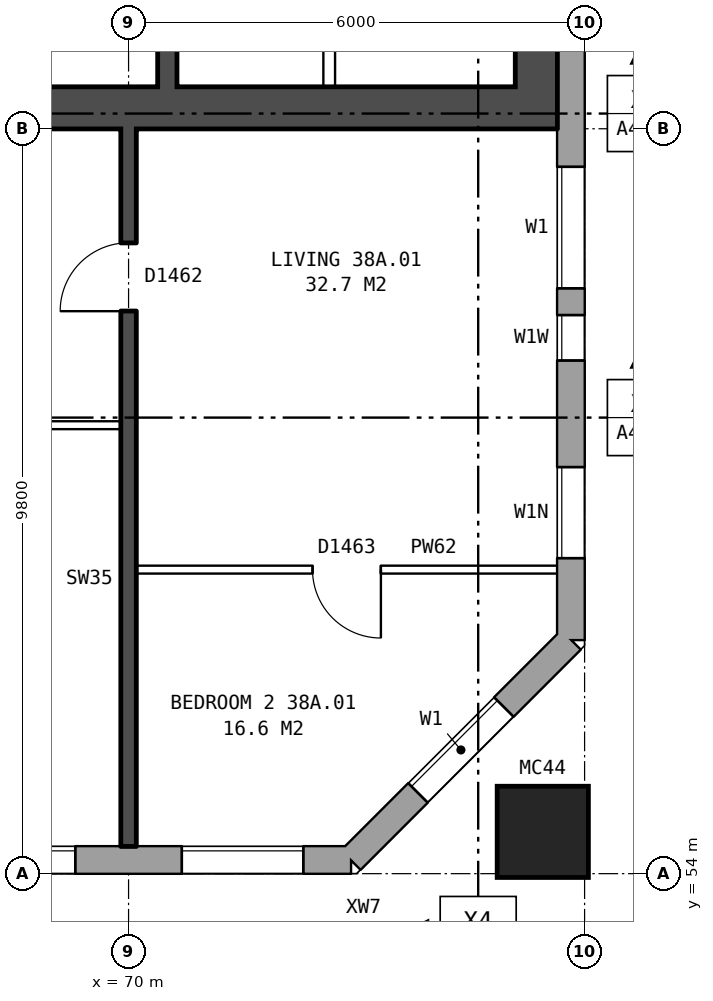
"""IFC4 building model, lengths in metres.
Left out: names, types, materials, properties, quantities, classifications, styles, units other than length and angle.
Written with IfcOpenShell. Run it as: python <this file> out.ifc"""

import sys

from ifc_helpers import new_model, si_unit, direction, frame, frame_2d, origin, origin_2d, place, context, subcontext, project, spatial, rectangle, hollow_rectangle, extrude, element, fill, save


model = new_model("IFC4")
c1 = context("Model", 3, precision=1e-05, world=origin(), true_north=direction((0.0, 1.0)))
c2 = subcontext(c1, "Body", "Model", "MODEL_VIEW")
j1 = project(units=[si_unit("LENGTHUNIT", "METRE"), si_unit("PLANEANGLEUNIT", "RADIAN")], contexts=[c1])
p1 = place(None, origin())
s1 = spatial("IfcSite", under=j1, at=p1, CompositionType="ELEMENT")
p2 = place(p1, origin())
s2 = spatial("IfcBuilding", under=s1, at=p2, CompositionType="ELEMENT")
p3 = place(p2, frame((0.0, 0.0, 136.1)))
s3 = spatial("IfcBuildingStorey", under=s2, at=p3, CompositionType="ELEMENT", Elevation=136.1)
p4 = place(p3, frame((75.45, 54.55, 0.0), z_axis=(0.0, 0.0, 1.0), x_axis=(1.0, 0.0, 0.0)))
e1 = element("IfcColumn", 1, at=p4, inside=s3, PredefinedType="COLUMN", context=c2, shape_type="SweptSolid", body=[
    extrude(hollow_rectangle(XDim=1.2, YDim=1.2, WallThickness=0.065, at=origin_2d()), origin(), (0.0, 0.0, 1.0), 3.1),
])
p5 = place(p3, frame((29.825, 54.18, 0.0), z_axis=(0.0, 0.0, 1.0), x_axis=(1.0, 0.0, 0.0)))
e2 = element("IfcWall", 2, at=p5, inside=s3, PredefinedType="STANDARD", context=c2, shape_type="SweptSolid", body=[
    extrude(rectangle(XDim=43.101, YDim=0.36, at=frame_2d((21.55, 0.0))), origin(), (0.0, 0.0, 1.0), 2.85),
])
p6 = place(p5, frame((1.875, 0.0, 0.8)))
e3 = element("IfcOpeningElement", 3, at=p6, cuts=e2, PredefinedType="OPENING", context=c2, shape_type="SweptSolid", body=[
    extrude(rectangle(XDim=1.6, YDim=1.8, at=frame_2d((0.8, 0.9))), frame((0.0, 0.19, 0.0), z_axis=(0.0, -1.0, 0.0), x_axis=(1.0, 0.0, 0.0)), (0.0, 0.0, 1.0), 0.38),
])
p7 = place(p5, frame((4.875, 0.0, 0.8)))
e4 = element("IfcOpeningElement", 4, at=p7, cuts=e2, PredefinedType="OPENING", context=c2, shape_type="SweptSolid", body=[
    extrude(rectangle(XDim=1.6, YDim=1.8, at=frame_2d((0.8, 0.9))), frame((0.0, 0.19, 0.0), z_axis=(0.0, -1.0, 0.0), x_axis=(1.0, 0.0, 0.0)), (0.0, 0.0, 1.0), 0.38),
])
p8 = place(p5, frame((7.875, 0.0, 0.8)))
e5 = element("IfcOpeningElement", 5, at=p8, cuts=e2, PredefinedType="OPENING", context=c2, shape_type="SweptSolid", body=[
    extrude(rectangle(XDim=1.6, YDim=1.8, at=frame_2d((0.8, 0.9))), frame((0.0, 0.19, 0.0), z_axis=(0.0, -1.0, 0.0), x_axis=(1.0, 0.0, 0.0)), (0.0, 0.0, 1.0), 0.38),
])
p9 = place(p5, frame((10.875, 0.0, 0.8)))
e6 = element("IfcOpeningElement", 6, at=p9, cuts=e2, PredefinedType="OPENING", context=c2, shape_type="SweptSolid", body=[
    extrude(rectangle(XDim=1.6, YDim=1.8, at=frame_2d((0.8, 0.9))), frame((0.0, 0.19, 0.0), z_axis=(0.0, -1.0, 0.0), x_axis=(1.0, 0.0, 0.0)), (0.0, 0.0, 1.0), 0.38),
])
p10 = place(p5, frame((13.875, 0.0, 0.8)))
e7 = element("IfcOpeningElement", 7, at=p10, cuts=e2, PredefinedType="OPENING", context=c2, shape_type="SweptSolid", body=[
    extrude(rectangle(XDim=1.6, YDim=1.8, at=frame_2d((0.8, 0.9))), frame((0.0, 0.19, 0.0), z_axis=(0.0, -1.0, 0.0), x_axis=(1.0, 0.0, 0.0)), (0.0, 0.0, 1.0), 0.38),
])
p11 = place(p5, frame((16.975, 0.0, 0.15)))
e8 = element("IfcOpeningElement", 8, at=p11, cuts=e2, PredefinedType="OPENING", context=c2, shape_type="SweptSolid", body=[
    extrude(rectangle(XDim=0.6, YDim=0.9, at=frame_2d((0.3, 0.45))), frame((0.0, 0.19, 0.0), z_axis=(0.0, -1.0, 0.0), x_axis=(1.0, 0.0, 0.0)), (0.0, 0.0, 1.0), 0.38),
])
p12 = place(p5, frame((19.875, 0.0, 0.8)))
e9 = element("IfcOpeningElement", 9, at=p12, cuts=e2, PredefinedType="OPENING", context=c2, shape_type="SweptSolid", body=[
    extrude(rectangle(XDim=1.6, YDim=1.8, at=frame_2d((0.8, 0.9))), frame((0.0, 0.19, 0.0), z_axis=(0.0, -1.0, 0.0), x_axis=(1.0, 0.0, 0.0)), (0.0, 0.0, 1.0), 0.38),
])
p13 = place(p5, frame((22.875, 0.0, 0.8)))
e10 = element("IfcOpeningElement", 10, at=p13, cuts=e2, PredefinedType="OPENING", context=c2, shape_type="SweptSolid", body=[
    extrude(rectangle(XDim=1.6, YDim=1.8, at=frame_2d((0.8, 0.9))), frame((0.0, 0.19, 0.0), z_axis=(0.0, -1.0, 0.0), x_axis=(1.0, 0.0, 0.0)), (0.0, 0.0, 1.0), 0.38),
])
p14 = place(p5, frame((25.325, 0.0, 0.15)))
e11 = element("IfcOpeningElement", 11, at=p14, cuts=e2, PredefinedType="OPENING", context=c2, shape_type="SweptSolid", body=[
    extrude(rectangle(XDim=0.8, YDim=0.9, at=frame_2d((0.4, 0.45))), frame((0.0, 0.19, 0.0), z_axis=(0.0, -1.0, 0.0), x_axis=(1.0, 0.0, 0.0)), (0.0, 0.0, 1.0), 0.38),
])
p15 = place(p5, frame((28.875, 0.0, 0.8)))
e12 = element("IfcOpeningElement", 12, at=p15, cuts=e2, PredefinedType="OPENING", context=c2, shape_type="SweptSolid", body=[
    extrude(rectangle(XDim=1.6, YDim=1.8, at=frame_2d((0.8, 0.9))), frame((0.0, 0.19, 0.0), z_axis=(0.0, -1.0, 0.0), x_axis=(1.0, 0.0, 0.0)), (0.0, 0.0, 1.0), 0.38),
])
p16 = place(p5, frame((31.875, 0.0, 0.8)))
e13 = element("IfcOpeningElement", 13, at=p16, cuts=e2, PredefinedType="OPENING", context=c2, shape_type="SweptSolid", body=[
    extrude(rectangle(XDim=1.6, YDim=1.8, at=frame_2d((0.8, 0.9))), frame((0.0, 0.19, 0.0), z_axis=(0.0, -1.0, 0.0), x_axis=(1.0, 0.0, 0.0)), (0.0, 0.0, 1.0), 0.38),
])
p17 = place(p5, frame((34.875, 0.0, 0.8)))
e14 = element("IfcOpeningElement", 14, at=p17, cuts=e2, PredefinedType="OPENING", context=c2, shape_type="SweptSolid", body=[
    extrude(rectangle(XDim=1.6, YDim=1.8, at=frame_2d((0.8, 0.9))), frame((0.0, 0.19, 0.0), z_axis=(0.0, -1.0, 0.0), x_axis=(1.0, 0.0, 0.0)), (0.0, 0.0, 1.0), 0.38),
])
p18 = place(p5, frame((37.875, 0.0, 0.8)))
e15 = element("IfcOpeningElement", 15, at=p18, cuts=e2, PredefinedType="OPENING", context=c2, shape_type="SweptSolid", body=[
    extrude(rectangle(XDim=1.6, YDim=1.8, at=frame_2d((0.8, 0.9))), frame((0.0, 0.19, 0.0), z_axis=(0.0, -1.0, 0.0), x_axis=(1.0, 0.0, 0.0)), (0.0, 0.0, 1.0), 0.38),
])
p19 = place(p5, frame((40.875, 0.0, 0.8)))
e16 = element("IfcOpeningElement", 16, at=p19, cuts=e2, PredefinedType="OPENING", context=c2, shape_type="SweptSolid", body=[
    extrude(rectangle(XDim=1.6, YDim=1.8, at=frame_2d((0.8, 0.9))), frame((0.0, 0.19, 0.0), z_axis=(0.0, -1.0, 0.0), x_axis=(1.0, 0.0, 0.0)), (0.0, 0.0, 1.0), 0.38),
])
p20 = place(p5, frame((17.925, 0.0, 0.15)))
e17 = element("IfcOpeningElement", 17, at=p20, cuts=e2, PredefinedType="OPENING", context=c2, shape_type="SweptSolid", body=[
    extrude(rectangle(XDim=1.0, YDim=1.8, at=frame_2d((0.5, 0.9))), frame((0.0, 0.19, 0.0), z_axis=(0.0, -1.0, 0.0), x_axis=(1.0, 0.0, 0.0)), (0.0, 0.0, 1.0), 0.38),
])
p21 = place(p5, frame((26.975, 0.0, 1.35)))
e18 = element("IfcOpeningElement", 18, at=p21, cuts=e2, PredefinedType="OPENING", context=c2, shape_type="SweptSolid", body=[
    extrude(rectangle(XDim=1.0, YDim=1.2, at=frame_2d((0.5, 0.6))), frame((0.0, 0.19, 0.0), z_axis=(0.0, -1.0, 0.0), x_axis=(1.0, 0.0, 0.0)), (0.0, 0.0, 1.0), 0.38),
])
p22 = place(p3, frame((72.925, 54.18, 0.0), z_axis=(0.0, 0.0, 1.0), x_axis=(0.707106781187, 0.707106781187, 0.0)))
e19 = element("IfcWall", 19, at=p22, inside=s3, PredefinedType="STANDARD", context=c2, shape_type="SweptSolid", body=[
    extrude(rectangle(XDim=4.094, YDim=0.36, at=frame_2d((2.047, 0.0))), origin(), (0.0, 0.0, 1.0), 2.85),
])
p23 = place(p22, frame((1.247, 0.0, 0.8)))
e20 = element("IfcOpeningElement", 20, at=p23, cuts=e19, PredefinedType="OPENING", context=c2, shape_type="SweptSolid", body=[
    extrude(rectangle(XDim=1.6, YDim=1.8, at=frame_2d((0.8, 0.9))), frame((0.0, 0.19, 0.0), z_axis=(0.0, -1.0, 0.0), x_axis=(1.0, 0.0, 0.0)), (0.0, 0.0, 1.0), 0.38),
])
p24 = place(p3, frame((75.82, 57.075, 0.0), z_axis=(0.0, 0.0, 1.0), x_axis=(0.0, 1.0, 0.0)))
e21 = element("IfcWall", 21, at=p24, inside=s3, PredefinedType="STANDARD", context=c2, shape_type="SweptSolid", body=[
    extrude(rectangle(XDim=25.851, YDim=0.36, at=frame_2d((12.925, 0.0))), origin(), (0.0, 0.0, 1.0), 2.85),
])
p25 = place(p24, frame((1.075, 0.0, 0.8)))
e22 = element("IfcOpeningElement", 22, at=p25, cuts=e21, PredefinedType="OPENING", context=c2, shape_type="SweptSolid", body=[
    extrude(rectangle(XDim=1.2, YDim=1.2, at=frame_2d((0.6, 0.6))), frame((0.0, 0.19, 0.0), z_axis=(0.0, -1.0, 0.0), x_axis=(1.0, 0.0, 0.0)), (0.0, 0.0, 1.0), 0.38),
])
p26 = place(p24, frame((4.625, 0.0, 0.8)))
e23 = element("IfcOpeningElement", 23, at=p26, cuts=e21, PredefinedType="OPENING", context=c2, shape_type="SweptSolid", body=[
    extrude(rectangle(XDim=1.6, YDim=1.8, at=frame_2d((0.8, 0.9))), frame((0.0, 0.19, 0.0), z_axis=(0.0, -1.0, 0.0), x_axis=(1.0, 0.0, 0.0)), (0.0, 0.0, 1.0), 0.38),
])
p27 = place(p24, frame((19.625, 0.0, 0.8)))
e24 = element("IfcOpeningElement", 24, at=p27, cuts=e21, PredefinedType="OPENING", context=c2, shape_type="SweptSolid", body=[
    extrude(rectangle(XDim=1.6, YDim=1.8, at=frame_2d((0.8, 0.9))), frame((0.0, 0.19, 0.0), z_axis=(0.0, -1.0, 0.0), x_axis=(1.0, 0.0, 0.0)), (0.0, 0.0, 1.0), 0.38),
])
p28 = place(p24, frame((23.125, 0.0, 0.8)))
e25 = element("IfcOpeningElement", 25, at=p28, cuts=e21, PredefinedType="OPENING", context=c2, shape_type="SweptSolid", body=[
    extrude(rectangle(XDim=1.0, YDim=0.9, at=frame_2d((0.5, 0.45))), frame((0.0, 0.19, 0.0), z_axis=(0.0, -1.0, 0.0), x_axis=(1.0, 0.0, 0.0)), (0.0, 0.0, 1.0), 0.38),
])
p29 = place(p24, frame((3.675, 0.0, 1.7)))
e26 = element("IfcOpeningElement", 26, at=p29, cuts=e21, PredefinedType="OPENING", context=c2, shape_type="SweptSolid", body=[
    extrude(rectangle(XDim=0.6, YDim=0.9, at=frame_2d((0.3, 0.45))), frame((0.0, 0.19, 0.0), z_axis=(0.0, -1.0, 0.0), x_axis=(1.0, 0.0, 0.0)), (0.0, 0.0, 1.0), 0.38),
])
p30 = place(p24, frame((24.425, 0.0, 0.8)))
e27 = element("IfcOpeningElement", 27, at=p30, cuts=e21, PredefinedType="OPENING", context=c2, shape_type="SweptSolid", body=[
    extrude(rectangle(XDim=1.0, YDim=1.8, at=frame_2d((0.5, 0.9))), frame((0.0, 0.19, 0.0), z_axis=(0.0, -1.0, 0.0), x_axis=(1.0, 0.0, 0.0)), (0.0, 0.0, 1.0), 0.38),
])
p31 = place(p3, frame((75.365, 63.8, 0.0), z_axis=(0.0, 0.0, 1.0), x_axis=(0.0, 1.0, 0.0)))
e28 = element("IfcWall", 28, at=p31, inside=s3, PredefinedType="SHEAR", context=c2, shape_type="SweptSolid", body=[
    extrude(rectangle(XDim=12.4, YDim=0.55, at=frame_2d((6.2, 0.0))), origin(), (0.0, 0.0, 1.0), 2.85),
])
p32 = place(p3, frame((67.19, 64.075, 0.0), z_axis=(0.0, 0.0, 1.0), x_axis=(1.0, 0.0, 0.0)))
e29 = element("IfcWall", 29, at=p32, inside=s3, PredefinedType="SHEAR", context=c2, shape_type="SweptSolid", body=[
    extrude(rectangle(XDim=7.9, YDim=0.55, at=frame_2d((3.95, 0.0))), origin(), (0.0, 0.0, 1.0), 2.85),
])
p33 = place(p3, frame((70.51, 64.35, 0.0), z_axis=(0.0, 0.0, 1.0), x_axis=(0.0, 1.0, 0.0)))
e30 = element("IfcWall", 30, at=p33, inside=s3, PredefinedType="SHEAR", context=c2, shape_type="SweptSolid", body=[
    extrude(rectangle(XDim=2.375, YDim=0.25, at=frame_2d((1.188, 0.0))), origin(), (0.0, 0.0, 1.0), 2.85),
])
p34 = place(p3, frame((72.64, 64.35, 0.0), z_axis=(0.0, 0.0, 1.0), x_axis=(0.0, 1.0, 0.0)))
e31 = element("IfcWall", 31, at=p34, inside=s3, PredefinedType="PARTITIONING", context=c2, shape_type="SweptSolid", body=[
    extrude(rectangle(XDim=1.875, YDim=0.15, at=frame_2d((0.938, 0.0))), origin(), (0.0, 0.0, 1.0), 2.85),
])
p35 = place(p34, frame((0.512, 0.0, 0.0)))
e32 = element("IfcOpeningElement", 32, at=p35, cuts=e31, PredefinedType="OPENING", context=c2, shape_type="SweptSolid", body=[
    extrude(rectangle(XDim=0.85, YDim=2.1, at=frame_2d((0.425, 1.05))), frame((0.0, 0.085, 0.0), z_axis=(0.0, -1.0, 0.0), x_axis=(1.0, 0.0, 0.0)), (0.0, 0.0, 1.0), 0.17),
])
p36 = place(p3, frame((70.1, 58.0, 0.0), z_axis=(0.0, 0.0, 1.0), x_axis=(1.0, 0.0, 0.0)))
e33 = element("IfcWall", 33, at=p36, inside=s3, PredefinedType="PARTITIONING", context=c2, shape_type="SweptSolid", body=[
    extrude(rectangle(XDim=5.54, YDim=0.1, at=frame_2d((2.77, 0.0))), origin(), (0.0, 0.0, 1.0), 2.85),
])
p37 = place(p36, frame((2.32, 0.0, 0.0)))
e34 = element("IfcOpeningElement", 34, at=p37, cuts=e33, PredefinedType="OPENING", context=c2, shape_type="SweptSolid", body=[
    extrude(rectangle(XDim=0.9, YDim=2.1, at=frame_2d((0.45, 1.05))), frame((0.0, 0.06, 0.0), z_axis=(0.0, -1.0, 0.0), x_axis=(1.0, 0.0, 0.0)), (0.0, 0.0, 1.0), 0.12),
])
p38 = place(p3, frame((64.1, 59.9, 0.0), z_axis=(0.0, 0.0, 1.0), x_axis=(1.0, 0.0, 0.0)))
e35 = element("IfcWall", 35, at=p38, inside=s3, PredefinedType="PARTITIONING", context=c2, shape_type="SweptSolid", body=[
    extrude(rectangle(XDim=5.8, YDim=0.1, at=frame_2d((2.9, 0.0))), origin(), (0.0, 0.0, 1.0), 2.85),
])
p39 = place(p38, frame((3.6, 0.0, 0.0)))
e36 = element("IfcOpeningElement", 36, at=p39, cuts=e35, PredefinedType="OPENING", context=c2, shape_type="SweptSolid", body=[
    extrude(rectangle(XDim=0.9, YDim=2.1, at=frame_2d((0.45, 1.05))), frame((0.0, 0.06, 0.0), z_axis=(0.0, -1.0, 0.0), x_axis=(1.0, 0.0, 0.0)), (0.0, 0.0, 1.0), 0.12),
])
p40 = place(p38, frame((0.7, 0.0, 0.0)))
e37 = element("IfcOpeningElement", 37, at=p40, cuts=e35, PredefinedType="OPENING", context=c2, shape_type="SweptSolid", body=[
    extrude(rectangle(XDim=0.9, YDim=2.1, at=frame_2d((0.45, 1.05))), frame((0.0, 0.06, 0.0), z_axis=(0.0, -1.0, 0.0), x_axis=(1.0, 0.0, 0.0)), (0.0, 0.0, 1.0), 0.12),
])
p41 = place(p3, frame((70.0, 54.36, 0.0), z_axis=(0.0, 0.0, 1.0), x_axis=(0.0, 1.0, 0.0)))
e38 = element("IfcWall", 38, at=p41, inside=s3, PredefinedType="SOLIDWALL", context=c2, shape_type="SweptSolid", body=[
    extrude(rectangle(XDim=9.44, YDim=0.2, at=frame_2d((4.72, 0.0))), origin(), (0.0, 0.0, 1.0), 2.85),
])
p42 = place(p41, frame((7.04, 0.0, 0.0)))
e39 = element("IfcOpeningElement", 39, at=p42, cuts=e38, PredefinedType="OPENING", context=c2, shape_type="SweptSolid", body=[
    extrude(rectangle(XDim=0.9, YDim=2.1, at=frame_2d((0.45, 1.05))), frame((0.0, 0.11, 0.0), z_axis=(0.0, -1.0, 0.0), x_axis=(1.0, 0.0, 0.0)), (0.0, 0.0, 1.0), 0.22),
])
p43 = place(p18, origin())
e40 = element("IfcWindow", 40, at=p43, inside=s3, PartitioningType="SINGLE_PANEL", PredefinedType="WINDOW", context=c2, shape_type="SweptSolid", body=[
    extrude(rectangle(XDim=1.6, YDim=1.8, at=frame_2d((0.8, 0.9))), frame((0.0, 0.15, 0.0), z_axis=(0.0, -1.0, 0.0), x_axis=(1.0, 0.0, 0.0)), (0.0, 0.0, 1.0), 0.06),
])
fill(e15, e40)
p44 = place(p19, origin())
e41 = element("IfcWindow", 41, at=p44, inside=s3, PartitioningType="SINGLE_PANEL", PredefinedType="WINDOW", context=c2, shape_type="SweptSolid", body=[
    extrude(rectangle(XDim=1.6, YDim=1.8, at=frame_2d((0.8, 0.9))), frame((0.0, 0.15, 0.0), z_axis=(0.0, -1.0, 0.0), x_axis=(1.0, 0.0, 0.0)), (0.0, 0.0, 1.0), 0.06),
])
fill(e16, e41)
p45 = place(p23, origin())
e42 = element("IfcWindow", 42, at=p45, inside=s3, PartitioningType="SINGLE_PANEL", PredefinedType="WINDOW", context=c2, shape_type="SweptSolid", body=[
    extrude(rectangle(XDim=1.6, YDim=1.8, at=frame_2d((0.8, 0.9))), frame((0.0, 0.15, 0.0), z_axis=(0.0, -1.0, 0.0), x_axis=(1.0, 0.0, 0.0)), (0.0, 0.0, 1.0), 0.06),
])
fill(e20, e42)
p46 = place(p25, origin())
e43 = element("IfcWindow", 43, at=p46, inside=s3, PartitioningType="SINGLE_PANEL", PredefinedType="WINDOW", context=c2, shape_type="SweptSolid", body=[
    extrude(rectangle(XDim=1.2, YDim=1.2, at=frame_2d((0.6, 0.6))), frame((0.0, 0.15, 0.0), z_axis=(0.0, -1.0, 0.0), x_axis=(1.0, 0.0, 0.0)), (0.0, 0.0, 1.0), 0.06),
])
fill(e22, e43)
p47 = place(p26, origin())
e44 = element("IfcWindow", 44, at=p47, inside=s3, PartitioningType="SINGLE_PANEL", PredefinedType="WINDOW", context=c2, shape_type="SweptSolid", body=[
    extrude(rectangle(XDim=1.6, YDim=1.8, at=frame_2d((0.8, 0.9))), frame((0.0, 0.15, 0.0), z_axis=(0.0, -1.0, 0.0), x_axis=(1.0, 0.0, 0.0)), (0.0, 0.0, 1.0), 0.06),
])
fill(e23, e44)
p48 = place(p37, frame((0.9, 0.0, 0.0), z_axis=(0.0, 0.0, 1.0), x_axis=(-1.0, 0.0, 0.0)))
e45 = element("IfcDoor", 45, at=p48, inside=s3, OperationType="SINGLE_SWING_LEFT", PredefinedType="DOOR", context=c2, shape_type="SweptSolid", body=[
    extrude(rectangle(XDim=0.9, YDim=2.1, at=frame_2d((0.45, 1.05))), frame((0.0, 0.025, 0.0), z_axis=(0.0, -1.0, 0.0), x_axis=(1.0, 0.0, 0.0)), (0.0, 0.0, 1.0), 0.05),
])
fill(e34, e45)
p49 = place(p42, origin())
e46 = element("IfcDoor", 46, at=p49, inside=s3, OperationType="SINGLE_SWING_LEFT", PredefinedType="DOOR", context=c2, shape_type="SweptSolid", body=[
    extrude(rectangle(XDim=0.9, YDim=2.1, at=frame_2d((0.45, 1.05))), frame((0.0, 0.025, 0.0), z_axis=(0.0, -1.0, 0.0), x_axis=(1.0, 0.0, 0.0)), (0.0, 0.0, 1.0), 0.05),
])
fill(e39, e46)
p50 = place(p29, origin())
e47 = element("IfcWindow", 47, at=p50, inside=s3, PartitioningType="SINGLE_PANEL", PredefinedType="WINDOW", context=c2, shape_type="SweptSolid", body=[
    extrude(rectangle(XDim=0.6, YDim=0.9, at=frame_2d((0.3, 0.45))), frame((0.0, 0.15, 0.0), z_axis=(0.0, -1.0, 0.0), x_axis=(1.0, 0.0, 0.0)), (0.0, 0.0, 1.0), 0.06),
])
fill(e26, e47)
save(model, sys.argv[1])
